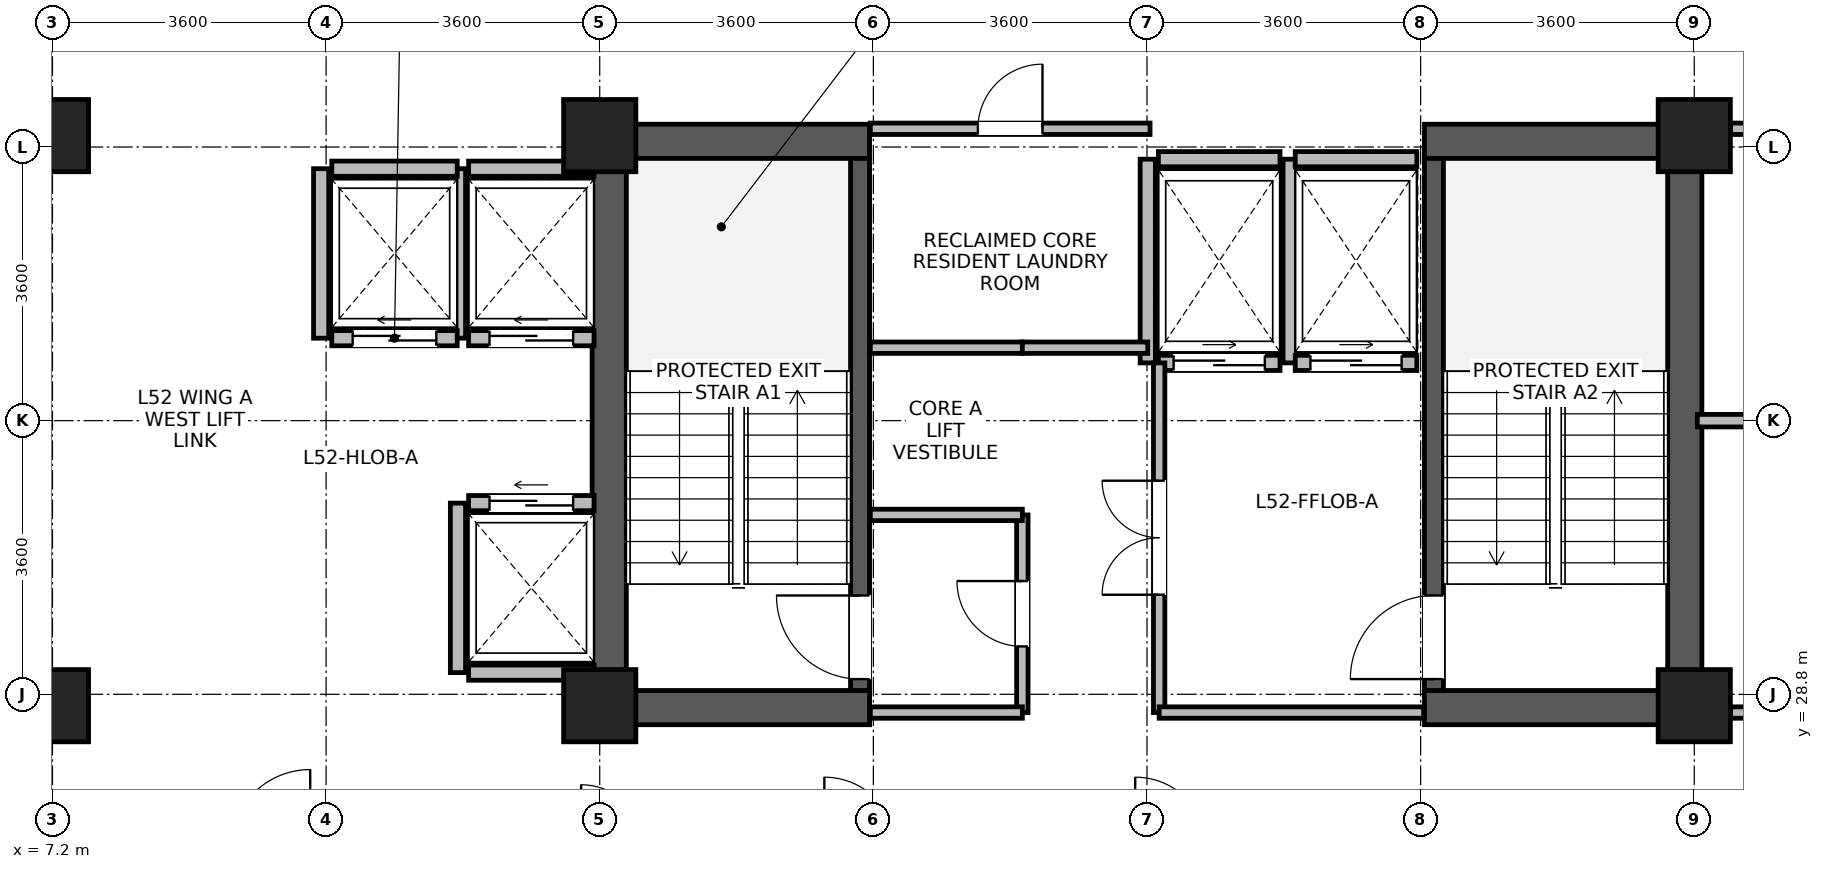
"""IFC4 building model, lengths in metres.
Left out: names, types, materials, properties, quantities, classifications, styles, units other than length and angle.
Written with IfcOpenShell. Run it as: python <this file> out.ifc"""

import sys

from ifc_helpers import new_model, si_unit, direction, frame, frame_2d, origin, origin_2d, place, context, subcontext, project, spatial, rectangle, extrude, source, transform, mapped, element, fill, save


model = new_model("IFC4")
c1 = context("Model", 3, precision=1e-05, world=origin(), true_north=direction((0.0, 1.0)))
c2 = subcontext(c1, "Body", "Model", "MODEL_VIEW")
j1 = project(units=[si_unit("LENGTHUNIT", "METRE"), si_unit("PLANEANGLEUNIT", "RADIAN")], contexts=[c1])
p1 = place(None, origin())
s1 = spatial("IfcSite", under=j1, at=p1, CompositionType="ELEMENT")
p2 = place(p1, origin())
s2 = spatial("IfcBuilding", under=s1, at=p2, CompositionType="ELEMENT")
p3 = place(p2, frame((0.0, 0.0, 205.5)))
s3 = spatial("IfcBuildingStorey", under=s2, at=p3, CompositionType="ELEMENT", Elevation=205.5)
for number, where, z_axis, x_axis in (
    (1, (14.525, 28.4, 0.0), (0.0, 0.0, 1.0), (0.0, 1.0, 0.0)),
    (2, (28.675, 28.4, 0.0), (0.0, 0.0, 1.0), (0.0, 1.0, 0.0)),
):
    element("IfcWall", number, at=place(p3, frame(where, z_axis=z_axis, x_axis=x_axis)), inside=s3, PredefinedType="SHEAR", context=c2, shape_type="SweptSolid", body=[
        extrude(rectangle(XDim=7.9, YDim=0.45, at=frame_2d((3.95, 0.0))), origin(), (0.0, 0.0, 1.0), 3.47),
    ])
for number, where, z_axis, x_axis in (
    (3, (14.75, 28.625, 0.0), (0.0, 0.0, 1.0), (1.0, 0.0, 0.0)),
    (4, (25.25, 28.625, 0.0), (0.0, 0.0, 1.0), (1.0, 0.0, 0.0)),
    (5, (14.75, 36.075, 0.0), (0.0, 0.0, 1.0), (1.0, 0.0, 0.0)),
    (6, (25.25, 36.075, 0.0), (0.0, 0.0, 1.0), (1.0, 0.0, 0.0)),
):
    element("IfcWall", number, at=place(p3, frame(where, z_axis=z_axis, x_axis=x_axis)), inside=s3, PredefinedType="SHEAR", context=c2, shape_type="SweptSolid", body=[
        extrude(rectangle(XDim=3.2, YDim=0.45, at=frame_2d((1.6, 0.0))), origin(), (0.0, 0.0, 1.0), 3.47),
    ])
p4 = place(p3, frame((17.825, 28.85, 0.0), z_axis=(0.0, 0.0, 1.0), x_axis=(0.0, 1.0, 0.0)))
e7 = element("IfcWall", 7, at=p4, inside=s3, PredefinedType="SHEAR", context=c2, shape_type="SweptSolid", body=[
    extrude(rectangle(XDim=7.0, YDim=0.25, at=frame_2d((3.5, 0.0))), origin(), (0.0, 0.0, 1.0), 3.47),
])
p5 = place(p4, frame((0.15, 0.0, 0.0)))
e8 = element("IfcOpeningElement", 8, at=p5, cuts=e7, PredefinedType="OPENING", context=c2, shape_type="SweptSolid", body=[
    extrude(rectangle(XDim=1.1, YDim=2.08, at=frame_2d((0.55, 1.04))), frame((0.0, 0.135, 0.0), z_axis=(0.0, -1.0, 0.0), x_axis=(1.0, 0.0, 0.0)), (0.0, 0.0, 1.0), 0.27),
])
p6 = place(p3, frame((25.375, 28.85, 0.0), z_axis=(0.0, 0.0, 1.0), x_axis=(0.0, 1.0, 0.0)))
e9 = element("IfcWall", 9, at=p6, inside=s3, PredefinedType="SHEAR", context=c2, shape_type="SweptSolid", body=[
    extrude(rectangle(XDim=7.0, YDim=0.25, at=frame_2d((3.5, 0.0))), origin(), (0.0, 0.0, 1.0), 3.47),
])
p7 = place(p6, frame((0.15, 0.0, 0.0)))
e10 = element("IfcOpeningElement", 10, at=p7, cuts=e9, PredefinedType="OPENING", context=c2, shape_type="SweptSolid", body=[
    extrude(rectangle(XDim=1.1, YDim=2.08, at=frame_2d((0.55, 1.04))), frame((0.0, 0.135, 0.0), z_axis=(0.0, -1.0, 0.0), x_axis=(1.0, 0.0, 0.0)), (0.0, 0.0, 1.0), 0.27),
])
m1 = source(origin(), c2, "Body", "SweptSolid", [
    extrude(rectangle(XDim=0.95, YDim=0.95, at=origin_2d()), origin(), (0.0, 0.0, 1.0), 3.7),
])
for number, where, z_axis, x_axis in (
    (11, (7.2, 28.65, 0.0), (0.0, 0.0, 1.0), (1.0, 0.0, 0.0)),
    (12, (7.2, 36.15, 0.0), (0.0, 0.0, 1.0), (1.0, 0.0, 0.0)),
    (13, (14.4, 28.65, 0.0), (0.0, 0.0, 1.0), (1.0, 0.0, 0.0)),
    (14, (14.4, 36.15, 0.0), (0.0, 0.0, 1.0), (1.0, 0.0, 0.0)),
    (15, (28.8, 28.65, 0.0), (0.0, 0.0, 1.0), (1.0, 0.0, 0.0)),
    (16, (28.8, 36.15, 0.0), (0.0, 0.0, 1.0), (1.0, 0.0, 0.0)),
):
    element("IfcColumn", number, at=place(p3, frame(where, z_axis=z_axis, x_axis=x_axis)), inside=s3, PredefinedType="COLUMN", context=c2, shape_type="MappedRepresentation", body=[
        mapped(m1, transform((0.0, 0.0, 0.0), x_axis=(1.0, 0.0, 0.0), y_axis=(0.0, 1.0, 0.0), z_axis=(0.0, 0.0, 1.0), scale=1.0)),
    ])
p8 = place(p3, frame((12.675, 33.485, 0.0), z_axis=(0.0, 0.0, 1.0), x_axis=(1.0, 0.0, 0.0)))
e17 = element("IfcWall", 17, at=p8, inside=s3, PredefinedType="PARTITIONING", context=c2, shape_type="SweptSolid", body=[
    extrude(rectangle(XDim=1.65, YDim=0.2, at=frame_2d((0.825, 0.0))), origin(), (0.0, 0.0, 1.0), 3.45),
])
p9 = place(p8, frame((0.275, 0.0, 0.0)))
e18 = element("IfcOpeningElement", 18, at=p9, cuts=e17, PredefinedType="OPENING", context=c2, shape_type="SweptSolid", body=[
    extrude(rectangle(XDim=1.1, YDim=2.12, at=frame_2d((0.55, 1.06))), frame((0.0, 0.11, 0.0), z_axis=(0.0, -1.0, 0.0), x_axis=(1.0, 0.0, 0.0)), (0.0, 0.0, 1.0), 0.22),
])
p10 = place(p3, frame((12.675, 35.715, 0.0), z_axis=(0.0, 0.0, 1.0), x_axis=(1.0, 0.0, 0.0)))
e19 = element("IfcWall", 19, at=p10, inside=s3, PredefinedType="PARTITIONING", context=c2, shape_type="SweptSolid", body=[
    extrude(rectangle(XDim=1.65, YDim=0.2, at=frame_2d((0.825, 0.0))), origin(), (0.0, 0.0, 1.0), 3.45),
])
p11 = place(p3, frame((12.535, 33.485, 0.0), z_axis=(0.0, 0.0, 1.0), x_axis=(0.0, 1.0, 0.0)))
e20 = element("IfcWall", 20, at=p11, inside=s3, PredefinedType="PARTITIONING", context=c2, shape_type="SweptSolid", body=[
    extrude(rectangle(XDim=2.23, YDim=0.2, at=frame_2d((1.115, 0.0))), origin(), (0.0, 0.0, 1.0), 3.45),
])
p12 = place(p3, frame((12.675, 29.085, 0.0), z_axis=(0.0, 0.0, 1.0), x_axis=(1.0, 0.0, 0.0)))
e21 = element("IfcWall", 21, at=p12, inside=s3, PredefinedType="PARTITIONING", context=c2, shape_type="SweptSolid", body=[
    extrude(rectangle(XDim=1.65, YDim=0.2, at=frame_2d((0.825, 0.0))), origin(), (0.0, 0.0, 1.0), 3.45),
])
p13 = place(p3, frame((12.675, 31.315, 0.0), z_axis=(0.0, 0.0, 1.0), x_axis=(1.0, 0.0, 0.0)))
e22 = element("IfcWall", 22, at=p13, inside=s3, PredefinedType="PARTITIONING", context=c2, shape_type="SweptSolid", body=[
    extrude(rectangle(XDim=1.65, YDim=0.2, at=frame_2d((0.825, 0.0))), origin(), (0.0, 0.0, 1.0), 3.45),
])
p14 = place(p13, frame((0.275, 0.0, 0.0)))
e23 = element("IfcOpeningElement", 23, at=p14, cuts=e22, PredefinedType="OPENING", context=c2, shape_type="SweptSolid", body=[
    extrude(rectangle(XDim=1.1, YDim=2.12, at=frame_2d((0.55, 1.06))), frame((0.0, 0.11, 0.0), z_axis=(0.0, -1.0, 0.0), x_axis=(1.0, 0.0, 0.0)), (0.0, 0.0, 1.0), 0.22),
])
p15 = place(p3, frame((12.535, 29.085, 0.0), z_axis=(0.0, 0.0, 1.0), x_axis=(0.0, 1.0, 0.0)))
e24 = element("IfcWall", 24, at=p15, inside=s3, PredefinedType="PARTITIONING", context=c2, shape_type="SweptSolid", body=[
    extrude(rectangle(XDim=2.23, YDim=0.2, at=frame_2d((1.115, 0.0))), origin(), (0.0, 0.0, 1.0), 3.45),
])
p16 = place(p3, frame((10.875, 33.485, 0.0), z_axis=(0.0, 0.0, 1.0), x_axis=(1.0, 0.0, 0.0)))
e25 = element("IfcWall", 25, at=p16, inside=s3, PredefinedType="PARTITIONING", context=c2, shape_type="SweptSolid", body=[
    extrude(rectangle(XDim=1.65, YDim=0.2, at=frame_2d((0.825, 0.0))), origin(), (0.0, 0.0, 1.0), 3.45),
])
p17 = place(p16, frame((0.275, 0.0, 0.0)))
e26 = element("IfcOpeningElement", 26, at=p17, cuts=e25, PredefinedType="OPENING", context=c2, shape_type="SweptSolid", body=[
    extrude(rectangle(XDim=1.1, YDim=2.12, at=frame_2d((0.55, 1.06))), frame((0.0, 0.11, 0.0), z_axis=(0.0, -1.0, 0.0), x_axis=(1.0, 0.0, 0.0)), (0.0, 0.0, 1.0), 0.22),
])
p18 = place(p3, frame((10.875, 35.715, 0.0), z_axis=(0.0, 0.0, 1.0), x_axis=(1.0, 0.0, 0.0)))
e27 = element("IfcWall", 27, at=p18, inside=s3, PredefinedType="PARTITIONING", context=c2, shape_type="SweptSolid", body=[
    extrude(rectangle(XDim=1.65, YDim=0.2, at=frame_2d((0.825, 0.0))), origin(), (0.0, 0.0, 1.0), 3.45),
])
p19 = place(p3, frame((10.735, 33.485, 0.0), z_axis=(0.0, 0.0, 1.0), x_axis=(0.0, 1.0, 0.0)))
e28 = element("IfcWall", 28, at=p19, inside=s3, PredefinedType="PARTITIONING", context=c2, shape_type="SweptSolid", body=[
    extrude(rectangle(XDim=2.23, YDim=0.2, at=frame_2d((1.115, 0.0))), origin(), (0.0, 0.0, 1.0), 3.45),
])
p20 = place(p3, frame((21.75, 33.16, 0.0), z_axis=(0.0, 0.0, 1.0), x_axis=(1.0, 0.0, 0.0)))
e29 = element("IfcWall", 29, at=p20, inside=s3, PredefinedType="PARTITIONING", context=c2, shape_type="SweptSolid", body=[
    extrude(rectangle(XDim=1.6, YDim=0.2, at=frame_2d((0.8, 0.0))), origin(), (0.0, 0.0, 1.0), 3.45),
])
p21 = place(p20, frame((0.2, 0.0, 0.0)))
e30 = element("IfcOpeningElement", 30, at=p21, cuts=e29, PredefinedType="OPENING", context=c2, shape_type="SweptSolid", body=[
    extrude(rectangle(XDim=1.2, YDim=2.12, at=frame_2d((0.6, 1.06))), frame((0.0, 0.11, 0.0), z_axis=(0.0, -1.0, 0.0), x_axis=(1.0, 0.0, 0.0)), (0.0, 0.0, 1.0), 0.22),
])
p22 = place(p3, frame((21.75, 35.84, 0.0), z_axis=(0.0, 0.0, 1.0), x_axis=(1.0, 0.0, 0.0)))
e31 = element("IfcWall", 31, at=p22, inside=s3, PredefinedType="PARTITIONING", context=c2, shape_type="SweptSolid", body=[
    extrude(rectangle(XDim=1.6, YDim=0.2, at=frame_2d((0.8, 0.0))), origin(), (0.0, 0.0, 1.0), 2.45),
])
for number, where, z_axis, x_axis in (
    (32, (21.61, 33.16, 0.0), (0.0, 0.0, 1.0), (0.0, 1.0, 0.0)),
    (33, (23.49, 33.16, 0.0), (0.0, 0.0, 1.0), (0.0, 1.0, 0.0)),
):
    element("IfcWall", number, at=place(p3, frame(where, z_axis=z_axis, x_axis=x_axis)), inside=s3, PredefinedType="PARTITIONING", context=c2, shape_type="SweptSolid", body=[
        extrude(rectangle(XDim=2.68, YDim=0.2, at=frame_2d((1.34, 0.0))), origin(), (0.0, 0.0, 1.0), 3.45),
    ])
p23 = place(p3, frame((23.55, 33.16, 0.0), z_axis=(0.0, 0.0, 1.0), x_axis=(1.0, 0.0, 0.0)))
e34 = element("IfcWall", 34, at=p23, inside=s3, PredefinedType="PARTITIONING", context=c2, shape_type="SweptSolid", body=[
    extrude(rectangle(XDim=1.6, YDim=0.2, at=frame_2d((0.8, 0.0))), origin(), (0.0, 0.0, 1.0), 3.45),
])
p24 = place(p23, frame((0.2, 0.0, 0.0)))
e35 = element("IfcOpeningElement", 35, at=p24, cuts=e34, PredefinedType="OPENING", context=c2, shape_type="SweptSolid", body=[
    extrude(rectangle(XDim=1.2, YDim=2.12, at=frame_2d((0.6, 1.06))), frame((0.0, 0.11, 0.0), z_axis=(0.0, -1.0, 0.0), x_axis=(1.0, 0.0, 0.0)), (0.0, 0.0, 1.0), 0.22),
])
p25 = place(p3, frame((23.55, 35.84, 0.0), z_axis=(0.0, 0.0, 1.0), x_axis=(1.0, 0.0, 0.0)))
e36 = element("IfcWall", 36, at=p25, inside=s3, PredefinedType="PARTITIONING", context=c2, shape_type="SweptSolid", body=[
    extrude(rectangle(XDim=1.6, YDim=0.2, at=frame_2d((0.8, 0.0))), origin(), (0.0, 0.0, 1.0), 2.45),
])
p26 = place(p3, frame((29.275, 28.56, 0.0), z_axis=(0.0, 0.0, 1.0), x_axis=(1.0, 0.0, 0.0)))
e37 = element("IfcWall", 37, at=p26, inside=s3, PredefinedType="PARTITIONING", context=c2, shape_type="SweptSolid", body=[
    extrude(rectangle(XDim=4.085, YDim=0.15, at=frame_2d((2.042, 0.0))), origin(), (0.0, 0.0, 1.0), 2.85),
])
p27 = place(p26, frame((1.613, 0.0, 0.0)))
e38 = element("IfcOpeningElement", 38, at=p27, cuts=e37, PredefinedType="OPENING", context=c2, shape_type="SweptSolid", body=[
    extrude(rectangle(XDim=0.86, YDim=2.02, at=frame_2d((0.43, 1.01))), frame((0.0, 0.085, 0.0), z_axis=(0.0, -1.0, 0.0), x_axis=(1.0, 0.0, 0.0)), (0.0, 0.0, 1.0), 0.17),
])
p28 = place(p3, frame((29.275, 36.24, 0.0), z_axis=(0.0, 0.0, 1.0), x_axis=(1.0, 0.0, 0.0)))
e39 = element("IfcWall", 39, at=p28, inside=s3, PredefinedType="PARTITIONING", context=c2, shape_type="SweptSolid", body=[
    extrude(rectangle(XDim=4.085, YDim=0.15, at=frame_2d((2.042, 0.0))), origin(), (0.0, 0.0, 1.0), 2.85),
])
p29 = place(p28, frame((1.393, 0.0, 0.0)))
e40 = element("IfcOpeningElement", 40, at=p29, cuts=e39, PredefinedType="OPENING", context=c2, shape_type="SweptSolid", body=[
    extrude(rectangle(XDim=1.3, YDim=2.12, at=frame_2d((0.65, 1.06))), frame((0.0, 0.085, 0.0), z_axis=(0.0, -1.0, 0.0), x_axis=(1.0, 0.0, 0.0)), (0.0, 0.0, 1.0), 0.17),
])
p30 = place(p3, frame((17.96, 36.24, 0.0), z_axis=(0.0, 0.0, 1.0), x_axis=(1.0, 0.0, 0.0)))
e41 = element("IfcWall", 41, at=p30, inside=s3, PredefinedType="PARTITIONING", context=c2, shape_type="SweptSolid", body=[
    extrude(rectangle(XDim=3.68, YDim=0.15, at=frame_2d((1.84, 0.0))), origin(), (0.0, 0.0, 1.0), 2.45),
])
p31 = place(p30, frame((1.415, 0.0, 0.0)))
e42 = element("IfcOpeningElement", 42, at=p31, cuts=e41, PredefinedType="OPENING", context=c2, shape_type="SweptSolid", body=[
    extrude(rectangle(XDim=0.85, YDim=2.04, at=frame_2d((0.425, 1.02))), frame((0.0, 0.085, 0.0), z_axis=(0.0, -1.0, 0.0), x_axis=(1.0, 0.0, 0.0)), (0.0, 0.0, 1.0), 0.17),
])
p32 = place(p3, frame((19.96, 28.56, 0.0), z_axis=(0.0, 0.0, 1.0), x_axis=(0.0, 1.0, 0.0)))
e43 = element("IfcWall", 43, at=p32, inside=s3, PredefinedType="PARTITIONING", context=c2, shape_type="SweptSolid", body=[
    extrude(rectangle(XDim=2.6, YDim=0.15, at=frame_2d((1.3, 0.0))), origin(), (0.0, 0.0, 1.0), 3.45),
])
p33 = place(p32, frame((0.87, 0.0, 0.0)))
e44 = element("IfcOpeningElement", 44, at=p33, cuts=e43, PredefinedType="OPENING", context=c2, shape_type="SweptSolid", body=[
    extrude(rectangle(XDim=0.86, YDim=2.02, at=frame_2d((0.43, 1.01))), frame((0.0, 0.085, 0.0), z_axis=(0.0, -1.0, 0.0), x_axis=(1.0, 0.0, 0.0)), (0.0, 0.0, 1.0), 0.17),
])
p34 = place(p3, frame((17.96, 28.56, 0.0), z_axis=(0.0, 0.0, 1.0), x_axis=(1.0, 0.0, 0.0)))
e45 = element("IfcWall", 45, at=p34, inside=s3, PredefinedType="PARTITIONING", context=c2, shape_type="SweptSolid", body=[
    extrude(rectangle(XDim=2.0, YDim=0.15, at=frame_2d((1.0, 0.0))), origin(), (0.0, 0.0, 1.0), 2.45),
])
for number, where, z_axis, x_axis in (
    (46, (17.96, 31.16, 0.0), (0.0, 0.0, 1.0), (1.0, 0.0, 0.0)),
    (47, (17.96, 33.36, 0.0), (0.0, 0.0, 1.0), (1.0, 0.0, 0.0)),
):
    element("IfcWall", number, at=place(p3, frame(where, z_axis=z_axis, x_axis=x_axis)), inside=s3, PredefinedType="PARTITIONING", context=c2, shape_type="SweptSolid", body=[
        extrude(rectangle(XDim=2.0, YDim=0.15, at=frame_2d((1.0, 0.0))), origin(), (0.0, 0.0, 1.0), 3.45),
    ])
p35 = place(p3, frame((19.96, 33.36, 0.0), z_axis=(0.0, 0.0, 1.0), x_axis=(1.0, 0.0, 0.0)))
e48 = element("IfcWall", 48, at=p35, inside=s3, PredefinedType="PARTITIONING", context=c2, shape_type="SweptSolid", body=[
    extrude(rectangle(XDim=1.65, YDim=0.15, at=frame_2d((0.825, 0.0))), origin(), (0.0, 0.0, 1.0), 3.45),
])
p36 = place(p3, frame((21.76, 28.56, 0.0), z_axis=(0.0, 0.0, 1.0), x_axis=(0.0, 1.0, 0.0)))
e49 = element("IfcWall", 49, at=p36, inside=s3, PredefinedType="PARTITIONING", context=c2, shape_type="SweptSolid", body=[
    extrude(rectangle(XDim=4.6, YDim=0.15, at=frame_2d((2.3, 0.0))), origin(), (0.0, 0.0, 1.0), 3.45),
])
p37 = place(p36, frame((1.55, 0.0, 0.0)))
e50 = element("IfcOpeningElement", 50, at=p37, cuts=e49, PredefinedType="OPENING", context=c2, shape_type="SweptSolid", body=[
    extrude(rectangle(XDim=1.5, YDim=2.1, at=frame_2d((0.75, 1.05))), frame((0.0, 0.085, 0.0), z_axis=(0.0, -1.0, 0.0), x_axis=(1.0, 0.0, 0.0)), (0.0, 0.0, 1.0), 0.17),
])
p38 = place(p3, frame((28.84, 32.4, 0.0), z_axis=(0.0, 0.0, 1.0), x_axis=(1.0, 0.0, 0.0)))
e51 = element("IfcWall", 51, at=p38, inside=s3, PredefinedType="PARTITIONING", context=c2, shape_type="SweptSolid", body=[
    extrude(rectangle(XDim=4.52, YDim=0.165, at=frame_2d((2.26, 0.0))), origin(), (0.0, 0.0, 1.0), 3.45),
])
p39 = place(p3, frame((21.76, 28.56, 0.0), z_axis=(0.0, 0.0, 1.0), x_axis=(1.0, 0.0, 0.0)))
e52 = element("IfcWall", 52, at=p39, inside=s3, PredefinedType="PARTITIONING", context=c2, shape_type="SweptSolid", body=[
    extrude(rectangle(XDim=3.48, YDim=0.15, at=frame_2d((1.74, 0.0))), origin(), (0.0, 0.0, 1.0), 2.45),
])
p40 = place(p5, origin())
e53 = element("IfcDoor", 53, at=p40, inside=s3, OperationType="SINGLE_SWING_RIGHT", PredefinedType="DOOR", context=c2, shape_type="SweptSolid", body=[
    extrude(rectangle(XDim=1.1, YDim=2.08, at=frame_2d((0.55, 1.04))), frame((0.0, 0.025, 0.0), z_axis=(0.0, -1.0, 0.0), x_axis=(1.0, 0.0, 0.0)), (0.0, 0.0, 1.0), 0.05),
])
fill(e8, e53)
p41 = place(p7, origin())
e54 = element("IfcDoor", 54, at=p41, inside=s3, OperationType="SINGLE_SWING_LEFT", PredefinedType="DOOR", context=c2, shape_type="SweptSolid", body=[
    extrude(rectangle(XDim=1.1, YDim=2.08, at=frame_2d((0.55, 1.04))), frame((0.0, 0.025, 0.0), z_axis=(0.0, -1.0, 0.0), x_axis=(1.0, 0.0, 0.0)), (0.0, 0.0, 1.0), 0.05),
])
fill(e10, e54)
p42 = place(p9, origin())
e55 = element("IfcDoor", 55, at=p42, inside=s3, OperationType="SLIDING_TO_LEFT", PredefinedType="DOOR", context=c2, shape_type="SweptSolid", body=[
    extrude(rectangle(XDim=1.1, YDim=2.12, at=frame_2d((0.55, 1.06))), frame((0.0, 0.025, 0.0), z_axis=(0.0, -1.0, 0.0), x_axis=(1.0, 0.0, 0.0)), (0.0, 0.0, 1.0), 0.05),
])
fill(e18, e55)
p43 = place(p14, origin())
e56 = element("IfcDoor", 56, at=p43, inside=s3, OperationType="SLIDING_TO_LEFT", PredefinedType="DOOR", context=c2, shape_type="SweptSolid", body=[
    extrude(rectangle(XDim=1.1, YDim=2.12, at=frame_2d((0.55, 1.06))), frame((0.0, 0.025, 0.0), z_axis=(0.0, -1.0, 0.0), x_axis=(1.0, 0.0, 0.0)), (0.0, 0.0, 1.0), 0.05),
])
fill(e23, e56)
p44 = place(p17, origin())
e57 = element("IfcDoor", 57, at=p44, inside=s3, OperationType="SLIDING_TO_LEFT", PredefinedType="DOOR", context=c2, shape_type="SweptSolid", body=[
    extrude(rectangle(XDim=1.1, YDim=2.12, at=frame_2d((0.55, 1.06))), frame((0.0, 0.025, 0.0), z_axis=(0.0, -1.0, 0.0), x_axis=(1.0, 0.0, 0.0)), (0.0, 0.0, 1.0), 0.05),
])
fill(e26, e57)
p45 = place(p21, origin())
e58 = element("IfcDoor", 58, at=p45, inside=s3, OperationType="SLIDING_TO_RIGHT", PredefinedType="DOOR", context=c2, shape_type="SweptSolid", body=[
    extrude(rectangle(XDim=1.2, YDim=2.12, at=frame_2d((0.6, 1.06))), frame((0.0, 0.025, 0.0), z_axis=(0.0, -1.0, 0.0), x_axis=(1.0, 0.0, 0.0)), (0.0, 0.0, 1.0), 0.05),
])
fill(e30, e58)
p46 = place(p24, origin())
e59 = element("IfcDoor", 59, at=p46, inside=s3, OperationType="SLIDING_TO_RIGHT", PredefinedType="DOOR", context=c2, shape_type="SweptSolid", body=[
    extrude(rectangle(XDim=1.2, YDim=2.12, at=frame_2d((0.6, 1.06))), frame((0.0, 0.025, 0.0), z_axis=(0.0, -1.0, 0.0), x_axis=(1.0, 0.0, 0.0)), (0.0, 0.0, 1.0), 0.05),
])
fill(e35, e59)
p47 = place(p31, origin())
e60 = element("IfcDoor", 60, at=p47, inside=s3, OperationType="SINGLE_SWING_RIGHT", PredefinedType="DOOR", context=c2, shape_type="SweptSolid", body=[
    extrude(rectangle(XDim=0.85, YDim=2.04, at=frame_2d((0.425, 1.02))), frame((0.0, 0.025, 0.0), z_axis=(0.0, -1.0, 0.0), x_axis=(1.0, 0.0, 0.0)), (0.0, 0.0, 1.0), 0.05),
])
fill(e42, e60)
p48 = place(p33, origin())
e61 = element("IfcDoor", 61, at=p48, inside=s3, OperationType="SINGLE_SWING_RIGHT", PredefinedType="DOOR", context=c2, shape_type="SweptSolid", body=[
    extrude(rectangle(XDim=0.86, YDim=2.02, at=frame_2d((0.43, 1.01))), frame((0.0, 0.025, 0.0), z_axis=(0.0, -1.0, 0.0), x_axis=(1.0, 0.0, 0.0)), (0.0, 0.0, 1.0), 0.05),
])
fill(e44, e61)
p49 = place(p37, origin())
e62 = element("IfcDoor", 62, at=p49, inside=s3, OperationType="DOUBLE_DOOR_SINGLE_SWING", PredefinedType="DOOR", context=c2, shape_type="SweptSolid", body=[
    extrude(rectangle(XDim=1.5, YDim=2.1, at=frame_2d((0.75, 1.05))), frame((0.0, 0.025, 0.0), z_axis=(0.0, -1.0, 0.0), x_axis=(1.0, 0.0, 0.0)), (0.0, 0.0, 1.0), 0.05),
])
fill(e50, e62)
save(model, sys.argv[1])
